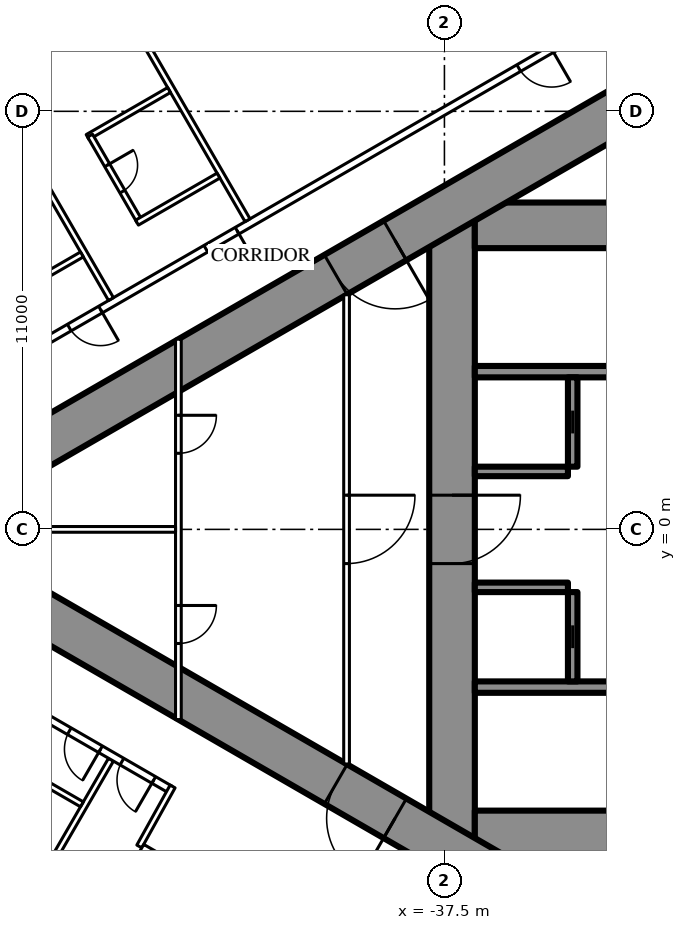
"""IFC4 building model, lengths in metres.
Left out: names, types, materials, properties, quantities, classifications, styles, units other than length and angle.
Written with IfcOpenShell. Run it as: python <this file> out.ifc"""

import sys

from ifc_helpers import new_model, si_unit, direction, frame, frame_2d, origin, place, context, subcontext, project, spatial, rectangle, extrude, element, fill, save


model = new_model("IFC4")
c1 = context("Model", 3, precision=1e-05, world=origin(), true_north=direction((0.0, 1.0)))
c2 = subcontext(c1, "Body", "Model", "MODEL_VIEW")
j1 = project(units=[si_unit("LENGTHUNIT", "METRE"), si_unit("PLANEANGLEUNIT", "RADIAN")], contexts=[c1])
p1 = place(None, origin())
s1 = spatial("IfcSite", under=j1, at=p1, CompositionType="ELEMENT")
p2 = place(p1, origin())
s2 = spatial("IfcBuilding", under=s1, at=p2, CompositionType="ELEMENT")
p3 = place(p2, frame((0.0, 0.0, 215.3)))
s3 = spatial("IfcBuildingStorey", under=s2, at=p3, CompositionType="ELEMENT", Elevation=215.3)
p4 = place(p3, frame((-37.3, 8.6, 0.0), z_axis=(0.0, 0.0, 1.0), x_axis=(0.0, -1.0, 0.0)))
e1 = element("IfcWall", 1, at=p4, inside=s3, PredefinedType="SHEAR", context=c2, shape_type="SweptSolid", body=[
    extrude(rectangle(XDim=17.2, YDim=1.2, at=frame_2d((8.6, 0.0))), origin(), (0.0, 0.0, 1.0), 3.6),
])
p5 = place(p4, frame((7.7, 0.0, 0.0)))
e2 = element("IfcOpeningElement", 2, at=p5, cuts=e1, PredefinedType="OPENING", context=c2, shape_type="SweptSolid", body=[
    extrude(rectangle(XDim=1.8, YDim=2.2, at=frame_2d((0.9, 1.1))), frame((0.0, 0.61, 0.0), z_axis=(0.0, -1.0, 0.0), x_axis=(1.0, 0.0, 0.0)), (0.0, 0.0, 1.0), 1.22),
])
p6 = place(p3, frame((-28.3, 8.0, 0.0), z_axis=(0.0, 0.0, 1.0), x_axis=(-1.0, 0.0, 0.0)))
e3 = element("IfcWall", 3, at=p6, inside=s3, PredefinedType="SHEAR", context=c2, shape_type="SweptSolid", body=[
    extrude(rectangle(XDim=8.4, YDim=1.2, at=frame_2d((4.2, 0.0))), origin(), (0.0, 0.0, 1.0), 3.6),
])
p7 = place(p6, frame((0.25, 0.0, 0.0)))
e4 = element("IfcOpeningElement", 4, at=p7, cuts=e3, PredefinedType="OPENING", context=c2, shape_type="SweptSolid", body=[
    extrude(rectangle(XDim=1.0, YDim=2.2, at=frame_2d((0.5, 1.1))), frame((0.0, 0.61, 0.0), z_axis=(0.0, -1.0, 0.0), x_axis=(1.0, 0.0, 0.0)), (0.0, 0.0, 1.0), 1.22),
])
p8 = place(p3, frame((-28.3, -8.0, 0.0), z_axis=(0.0, 0.0, 1.0), x_axis=(-1.0, 0.0, 0.0)))
e5 = element("IfcWall", 5, at=p8, inside=s3, PredefinedType="SHEAR", context=c2, shape_type="SweptSolid", body=[
    extrude(rectangle(XDim=8.4, YDim=1.2, at=frame_2d((4.2, 0.0))), origin(), (0.0, 0.0, 1.0), 3.6),
])
p9 = place(p8, frame((0.25, 0.0, 0.0)))
e6 = element("IfcOpeningElement", 6, at=p9, cuts=e5, PredefinedType="OPENING", context=c2, shape_type="SweptSolid", body=[
    extrude(rectangle(XDim=1.0, YDim=2.2, at=frame_2d((0.5, 1.1))), frame((0.0, 0.61, 0.0), z_axis=(0.0, -1.0, 0.0), x_axis=(1.0, 0.0, 0.0)), (0.0, 0.0, 1.0), 1.22),
])
for number, where, z_axis, x_axis in (
    (7, (-28.3, 4.15, 0.0), (0.0, 0.0, 1.0), (-1.0, 0.0, 0.0)),
    (8, (-28.3, -4.15, 0.0), (0.0, 0.0, 1.0), (-1.0, 0.0, 0.0)),
):
    element("IfcWall", number, at=place(p3, frame(where, z_axis=z_axis, x_axis=x_axis)), inside=s3, PredefinedType="SHEAR", context=c2, shape_type="SweptSolid", body=[
        extrude(rectangle(XDim=8.4, YDim=0.3, at=frame_2d((4.2, 0.0))), origin(), (0.0, 0.0, 1.0), 3.6),
    ])
p10 = place(p3, frame((-34.125, 4.0, 0.0), z_axis=(0.0, 0.0, 1.0), x_axis=(0.0, -1.0, 0.0)))
e9 = element("IfcWall", 9, at=p10, inside=s3, PredefinedType="SHEAR", context=c2, shape_type="SweptSolid", body=[
    extrude(rectangle(XDim=2.35, YDim=0.25, at=frame_2d((1.175, 0.0))), origin(), (0.0, 0.0, 1.0), 3.6),
])
p11 = place(p10, frame((0.875, 0.0, 0.0)))
e10 = element("IfcOpeningElement", 10, at=p11, cuts=e9, PredefinedType="OPENING", context=c2, shape_type="SweptSolid", body=[
    extrude(rectangle(XDim=0.6, YDim=2.0, at=frame_2d((0.3, 1.0))), frame((0.0, 0.135, 0.0), z_axis=(0.0, -1.0, 0.0), x_axis=(1.0, 0.0, 0.0)), (0.0, 0.0, 1.0), 0.27),
])
p12 = place(p3, frame((-34.25, 1.525, 0.0), z_axis=(0.0, 0.0, 1.0), x_axis=(-1.0, 0.0, 0.0)))
e11 = element("IfcWall", 11, at=p12, inside=s3, PredefinedType="SHEAR", context=c2, shape_type="SweptSolid", body=[
    extrude(rectangle(XDim=2.45, YDim=0.25, at=frame_2d((1.225, 0.0))), origin(), (0.0, 0.0, 1.0), 3.6),
])
p13 = place(p3, frame((-34.125, -1.65, 0.0), z_axis=(0.0, 0.0, 1.0), x_axis=(0.0, -1.0, 0.0)))
e12 = element("IfcWall", 12, at=p13, inside=s3, PredefinedType="SHEAR", context=c2, shape_type="SweptSolid", body=[
    extrude(rectangle(XDim=2.35, YDim=0.25, at=frame_2d((1.175, 0.0))), origin(), (0.0, 0.0, 1.0), 3.6),
])
p14 = place(p13, frame((0.875, 0.0, 0.0)))
e13 = element("IfcOpeningElement", 13, at=p14, cuts=e12, PredefinedType="OPENING", context=c2, shape_type="SweptSolid", body=[
    extrude(rectangle(XDim=0.6, YDim=2.0, at=frame_2d((0.3, 1.0))), frame((0.0, 0.135, 0.0), z_axis=(0.0, -1.0, 0.0), x_axis=(1.0, 0.0, 0.0)), (0.0, 0.0, 1.0), 0.27),
])
p15 = place(p3, frame((-34.25, -1.525, 0.0), z_axis=(0.0, 0.0, 1.0), x_axis=(-1.0, 0.0, 0.0)))
e14 = element("IfcWall", 14, at=p15, inside=s3, PredefinedType="SHEAR", context=c2, shape_type="SweptSolid", body=[
    extrude(rectangle(XDim=2.45, YDim=0.25, at=frame_2d((1.225, 0.0))), origin(), (0.0, 0.0, 1.0), 3.6),
])
p16 = place(p3, frame((-27.2, 14.3, 0.0), z_axis=(0.0, 0.0, 1.0), x_axis=(-0.866026593062, -0.499997940104, 0.0)))
e15 = element("IfcWall", 15, at=p16, inside=s3, PredefinedType="SHEAR", context=c2, shape_type="SweptSolid", body=[
    extrude(rectangle(XDim=28.946, YDim=1.2, at=frame_2d((14.473, 0.0))), origin(), (0.0, 0.0, 1.0), 3.6),
])
p17 = place(p16, frame((4.6, 0.0, 0.0)))
e16 = element("IfcOpeningElement", 16, at=p17, cuts=e15, PredefinedType="OPENING", context=c2, shape_type="SweptSolid", body=[
    extrude(rectangle(XDim=1.0, YDim=2.2, at=frame_2d((0.5, 1.1))), frame((0.0, 0.61, 0.0), z_axis=(0.0, -1.0, 0.0), x_axis=(1.0, 0.0, 0.0)), (0.0, 0.0, 1.0), 1.22),
])
p18 = place(p16, frame((13.395, 0.0, 0.0)))
e17 = element("IfcOpeningElement", 17, at=p18, cuts=e15, PredefinedType="OPENING", context=c2, shape_type="SweptSolid", body=[
    extrude(rectangle(XDim=1.8, YDim=2.2, at=frame_2d((0.9, 1.1))), frame((0.0, 0.61, 0.0), z_axis=(0.0, -1.0, 0.0), x_axis=(1.0, 0.0, 0.0)), (0.0, 0.0, 1.0), 1.22),
])
p19 = place(p3, frame((-27.2, -14.3, 0.0), z_axis=(0.0, 0.0, 1.0), x_axis=(-0.866024021859, 0.500002393557, 0.0)))
e18 = element("IfcWall", 18, at=p19, inside=s3, PredefinedType="SHEAR", context=c2, shape_type="SweptSolid", body=[
    extrude(rectangle(XDim=27.907, YDim=1.2, at=frame_2d((13.954, 0.0))), origin(), (0.0, 0.0, 1.0), 3.6),
])
p20 = place(p19, frame((4.6, 0.0, 0.0)))
e19 = element("IfcOpeningElement", 19, at=p20, cuts=e18, PredefinedType="OPENING", context=c2, shape_type="SweptSolid", body=[
    extrude(rectangle(XDim=1.0, YDim=2.2, at=frame_2d((0.5, 1.1))), frame((0.0, 0.61, 0.0), z_axis=(0.0, -1.0, 0.0), x_axis=(1.0, 0.0, 0.0)), (0.0, 0.0, 1.0), 1.22),
])
p21 = place(p19, frame((13.395, 0.0, 0.0)))
e20 = element("IfcOpeningElement", 20, at=p21, cuts=e18, PredefinedType="OPENING", context=c2, shape_type="SweptSolid", body=[
    extrude(rectangle(XDim=1.8, YDim=2.2, at=frame_2d((0.9, 1.1))), frame((0.0, 0.61, 0.0), z_axis=(0.0, -1.0, 0.0), x_axis=(1.0, 0.0, 0.0)), (0.0, 0.0, 1.0), 1.22),
])
p22 = place(p3, frame((-28.737, 16.068, 0.0), z_axis=(0.0, 0.0, 1.0), x_axis=(-0.866026057212, -0.499998868229, 0.0)))
e21 = element("IfcWall", 21, at=p22, inside=s3, PredefinedType="PARTITIONING", context=c2, shape_type="SweptSolid", body=[
    extrude(rectangle(XDim=32.137, YDim=0.2, at=frame_2d((16.068, 0.0))), origin(), (0.0, 0.0, 1.0), 3.35),
])
p23 = place(p22, frame((1.08, 0.0, 0.0)))
e22 = element("IfcOpeningElement", 22, at=p23, cuts=e21, PredefinedType="OPENING", context=c2, shape_type="SweptSolid", body=[
    extrude(rectangle(XDim=1.8, YDim=2.03, at=frame_2d((0.9, 1.015))), frame((0.0, 0.11, 0.0), z_axis=(0.0, -1.0, 0.0), x_axis=(1.0, 0.0, 0.0)), (0.0, 0.0, 1.0), 0.22),
])
p24 = place(p22, frame((6.86, 0.0, 0.0)))
e23 = element("IfcOpeningElement", 23, at=p24, cuts=e21, PredefinedType="OPENING", context=c2, shape_type="SweptSolid", body=[
    extrude(rectangle(XDim=1.0, YDim=2.2, at=frame_2d((0.5, 1.1))), frame((0.0, 0.11, 0.0), z_axis=(0.0, -1.0, 0.0), x_axis=(1.0, 0.0, 0.0)), (0.0, 0.0, 1.0), 0.22),
])
p25 = place(p22, frame((16.418, 0.0, 0.0)))
e24 = element("IfcOpeningElement", 24, at=p25, cuts=e21, PredefinedType="OPENING", context=c2, shape_type="SweptSolid", body=[
    extrude(rectangle(XDim=0.95, YDim=2.2, at=frame_2d((0.475, 1.1))), frame((0.0, 0.11, 0.0), z_axis=(0.0, -1.0, 0.0), x_axis=(1.0, 0.0, 0.0)), (0.0, 0.0, 1.0), 0.22),
])
p26 = place(p22, frame((20.567, 0.0, 0.0)))
e25 = element("IfcOpeningElement", 25, at=p26, cuts=e21, PredefinedType="OPENING", context=c2, shape_type="SweptSolid", body=[
    extrude(rectangle(XDim=0.95, YDim=2.2, at=frame_2d((0.475, 1.1))), frame((0.0, 0.11, 0.0), z_axis=(0.0, -1.0, 0.0), x_axis=(1.0, 0.0, 0.0)), (0.0, 0.0, 1.0), 0.22),
])
p27 = place(p22, frame((27.065, 0.0, 0.0)))
e26 = element("IfcOpeningElement", 26, at=p27, cuts=e21, PredefinedType="OPENING", context=c2, shape_type="SweptSolid", body=[
    extrude(rectangle(XDim=0.95, YDim=2.2, at=frame_2d((0.475, 1.1))), frame((0.0, 0.11, 0.0), z_axis=(0.0, -1.0, 0.0), x_axis=(1.0, 0.0, 0.0)), (0.0, 0.0, 1.0), 0.22),
])
p28 = place(p3, frame((-42.68, 8.134, 0.0), z_axis=(0.0, 0.0, 1.0), x_axis=(-0.499984479505, 0.866034364361, 0.0)))
e27 = element("IfcWall", 27, at=p28, inside=s3, PredefinedType="PARTITIONING", context=c2, shape_type="SweptSolid", body=[
    extrude(rectangle(XDim=5.995, YDim=0.15, at=frame_2d((2.998, 0.0))), origin(), (0.0, 0.0, 1.0), 2.45),
])
for number, where, z_axis, x_axis in (
    (28, (-46.274, 6.059, 0.0), (0.0, 0.0, 1.0), (-0.5, 0.866, 0.0)),
    (29, (-46.274, -6.059, 0.0), (0.0, 0.0, 1.0), (-0.5, -0.866, 0.0)),
):
    element("IfcWall", number, at=place(p3, frame(where, z_axis=z_axis, x_axis=x_axis)), inside=s3, PredefinedType="PARTITIONING", context=c2, shape_type="SweptSolid", body=[
        extrude(rectangle(XDim=6.028, YDim=0.15, at=frame_2d((3.014, 0.0))), origin(), (0.0, 0.0, 1.0), 2.45),
    ])
p29 = place(p3, frame((-44.715, -6.844, 0.0), z_axis=(0.0, 0.0, 1.0), x_axis=(-0.866025261224, 0.500000246922, 0.0)))
e30 = element("IfcWall", 30, at=p29, inside=s3, PredefinedType="PARTITIONING", context=c2, shape_type="SweptSolid", body=[
    extrude(rectangle(XDim=13.567, YDim=0.2, at=frame_2d((6.783, 0.0))), origin(), (0.0, 0.0, 1.0), 3.35),
])
p30 = place(p29, frame((9.667, 0.0, 0.0)))
e31 = element("IfcOpeningElement", 31, at=p30, cuts=e30, PredefinedType="OPENING", context=c2, shape_type="SweptSolid", body=[
    extrude(rectangle(XDim=0.95, YDim=2.2, at=frame_2d((0.475, 1.1))), frame((0.0, 0.11, 0.0), z_axis=(0.0, -1.0, 0.0), x_axis=(1.0, 0.0, 0.0)), (0.0, 0.0, 1.0), 0.22),
])
p31 = place(p29, frame((2.117, 0.0, 0.0)))
e32 = element("IfcOpeningElement", 32, at=p31, cuts=e30, PredefinedType="OPENING", context=c2, shape_type="SweptSolid", body=[
    extrude(rectangle(XDim=0.95, YDim=2.2, at=frame_2d((0.475, 1.1))), frame((0.0, 0.11, 0.0), z_axis=(0.0, -1.0, 0.0), x_axis=(1.0, 0.0, 0.0)), (0.0, 0.0, 1.0), 0.22),
])
p32 = place(p29, frame((0.5, 0.0, 0.0)))
e33 = element("IfcOpeningElement", 33, at=p32, cuts=e30, PredefinedType="OPENING", context=c2, shape_type="SweptSolid", body=[
    extrude(rectangle(XDim=0.967, YDim=2.2, at=frame_2d((0.483, 1.1))), frame((0.0, 0.11, 0.0), z_axis=(0.0, -1.0, 0.0), x_axis=(1.0, 0.0, 0.0)), (0.0, 0.0, 1.0), 0.22),
])
p33 = place(p3, frame((-44.652, -6.764, 0.0), z_axis=(0.0, 0.0, 1.0), x_axis=(-0.485424724123, -0.874278466629, 0.0)))
e34 = element("IfcWall", 34, at=p33, inside=s3, PredefinedType="PARTITIONING", context=c2, shape_type="SweptSolid", body=[
    extrude(rectangle(XDim=1.805, YDim=0.15, at=frame_2d((0.903, 0.0))), origin(), (0.0, 0.0, 1.0), 3.35),
])
p34 = place(p3, frame((-44.745, 11.56, 0.0), z_axis=(0.0, 0.0, 1.0), x_axis=(-0.866006523861, -0.500032699561, 0.0)))
e35 = element("IfcWall", 35, at=p34, inside=s3, PredefinedType="PARTITIONING", context=c2, shape_type="SweptSolid", body=[
    extrude(rectangle(XDim=2.475, YDim=0.15, at=frame_2d((1.237, 0.0))), origin(), (0.0, 0.0, 1.0), 3.35),
])
p35 = place(p3, frame((-45.524, 8.109, 0.0), z_axis=(0.0, 0.0, 1.0), x_axis=(-0.49997716683, 0.86603858612, 0.0)))
e36 = element("IfcWall", 36, at=p35, inside=s3, PredefinedType="PARTITIONING", context=c2, shape_type="SweptSolid", body=[
    extrude(rectangle(XDim=2.6, YDim=0.15, at=frame_2d((1.3, 0.0))), origin(), (0.0, 0.0, 1.0), 3.35),
])
p36 = place(p35, frame((0.9, 0.0, 0.0)))
e37 = element("IfcOpeningElement", 37, at=p36, cuts=e36, PredefinedType="OPENING", context=c2, shape_type="SweptSolid", body=[
    extrude(rectangle(XDim=0.8, YDim=2.2, at=frame_2d((0.4, 1.1))), frame((0.0, 0.085, 0.0), z_axis=(0.0, -1.0, 0.0), x_axis=(1.0, 0.0, 0.0)), (0.0, 0.0, 1.0), 0.17),
])
for number, where, z_axis, x_axis in (
    (38, (-43.445, 9.309, 0.0), (0.0, 0.0, 1.0), (-0.866, -0.5, 0.0)),
    (39, (-47.039, 7.234, 0.0), (0.0, 0.0, 1.0), (-0.866, -0.5, 0.0)),
):
    element("IfcWall", number, at=place(p3, frame(where, z_axis=z_axis, x_axis=x_axis)), inside=s3, PredefinedType="PARTITIONING", context=c2, shape_type="SweptSolid", body=[
        extrude(rectangle(XDim=2.475, YDim=0.15, at=frame_2d((1.238, 0.0))), origin(), (0.0, 0.0, 1.0), 3.35),
    ])
p37 = place(p3, frame((-47.039, -7.234, 0.0), z_axis=(0.0, 0.0, 1.0), x_axis=(-0.866073894602, 0.499916002032, 0.0)))
e40 = element("IfcWall", 40, at=p37, inside=s3, PredefinedType="PARTITIONING", context=c2, shape_type="SweptSolid", body=[
    extrude(rectangle(XDim=2.475, YDim=0.15, at=frame_2d((1.238, 0.0))), origin(), (0.0, 0.0, 1.0), 2.5),
])
p38 = place(p3, frame((-40.075, 6.174, 0.0), z_axis=(0.0, 0.0, 1.0), x_axis=(0.0, -1.0, 0.0)))
e41 = element("IfcWall", 41, at=p38, inside=s3, PredefinedType="PARTITIONING", context=c2, shape_type="SweptSolid", body=[
    extrude(rectangle(XDim=12.348, YDim=0.15, at=frame_2d((6.174, 0.0))), origin(), (0.0, 0.0, 1.0), 3.35),
])
p39 = place(p38, frame((5.274, 0.0, 0.0)))
e42 = element("IfcOpeningElement", 42, at=p39, cuts=e41, PredefinedType="OPENING", context=c2, shape_type="SweptSolid", body=[
    extrude(rectangle(XDim=1.8, YDim=2.2, at=frame_2d((0.9, 1.1))), frame((0.0, 0.085, 0.0), z_axis=(0.0, -1.0, 0.0), x_axis=(1.0, 0.0, 0.0)), (0.0, 0.0, 1.0), 0.17),
])
p40 = place(p3, frame((-44.5, 5.005, 0.0), z_axis=(0.0, 0.0, 1.0), x_axis=(0.0, -1.0, 0.0)))
e43 = element("IfcWall", 43, at=p40, inside=s3, PredefinedType="PARTITIONING", context=c2, shape_type="SweptSolid", body=[
    extrude(rectangle(XDim=10.009, YDim=0.15, at=frame_2d((5.005, 0.0))), origin(), (0.0, 0.0, 1.0), 2.5),
])
p41 = place(p40, frame((2.002, 0.0, 0.0)))
e44 = element("IfcOpeningElement", 44, at=p41, cuts=e43, PredefinedType="OPENING", context=c2, shape_type="SweptSolid", body=[
    extrude(rectangle(XDim=1.0, YDim=2.2, at=frame_2d((0.5, 1.1))), frame((0.0, 0.085, 0.0), z_axis=(0.0, -1.0, 0.0), x_axis=(1.0, 0.0, 0.0)), (0.0, 0.0, 1.0), 0.17),
])
p42 = place(p40, frame((7.007, 0.0, 0.0)))
e45 = element("IfcOpeningElement", 45, at=p42, cuts=e43, PredefinedType="OPENING", context=c2, shape_type="SweptSolid", body=[
    extrude(rectangle(XDim=1.0, YDim=2.2, at=frame_2d((0.5, 1.1))), frame((0.0, 0.085, 0.0), z_axis=(0.0, -1.0, 0.0), x_axis=(1.0, 0.0, 0.0)), (0.0, 0.0, 1.0), 0.17),
])
p43 = place(p3, frame((-44.575, 0.0, 0.0), z_axis=(0.0, 0.0, 1.0), x_axis=(-1.0, 0.0, 0.0)))
e46 = element("IfcWall", 46, at=p43, inside=s3, PredefinedType="PARTITIONING", context=c2, shape_type="SweptSolid", body=[
    extrude(rectangle(XDim=8.593, YDim=0.15, at=frame_2d((4.297, 0.0))), origin(), (0.0, 0.0, 1.0), 2.45),
])
p44 = place(p3, frame((-39.758, -11.697, 0.0), z_axis=(0.0, 0.0, 1.0), x_axis=(-0.866024194504, 0.500002094529, 0.0)))
e47 = element("IfcWall", 47, at=p44, inside=s3, PredefinedType="PARTITIONING", context=c2, shape_type="SweptSolid", body=[
    extrude(rectangle(XDim=6.6, YDim=0.25, at=frame_2d((3.3, 0.0))), origin(), (0.0, 0.0, 1.0), 3.35),
])
p45 = place(p44, frame((0.75, 0.0, 0.0)))
e48 = element("IfcOpeningElement", 48, at=p45, cuts=e47, PredefinedType="OPENING", context=c2, shape_type="SweptSolid", body=[
    extrude(rectangle(XDim=1.1, YDim=2.2, at=frame_2d((0.55, 1.1))), frame((0.0, 0.135, 0.0), z_axis=(0.0, -1.0, 0.0), x_axis=(1.0, 0.0, 0.0)), (0.0, 0.0, 1.0), 0.27),
])
p46 = place(p44, frame((2.75, 0.0, 0.0)))
e49 = element("IfcOpeningElement", 49, at=p46, cuts=e47, PredefinedType="OPENING", context=c2, shape_type="SweptSolid", body=[
    extrude(rectangle(XDim=1.1, YDim=2.2, at=frame_2d((0.55, 1.1))), frame((0.0, 0.135, 0.0), z_axis=(0.0, -1.0, 0.0), x_axis=(1.0, 0.0, 0.0)), (0.0, 0.0, 1.0), 0.27),
])
p47 = place(p44, frame((4.75, 0.0, 0.0)))
e50 = element("IfcOpeningElement", 50, at=p47, cuts=e47, PredefinedType="OPENING", context=c2, shape_type="SweptSolid", body=[
    extrude(rectangle(XDim=1.1, YDim=2.2, at=frame_2d((0.55, 1.1))), frame((0.0, 0.135, 0.0), z_axis=(0.0, -1.0, 0.0), x_axis=(1.0, 0.0, 0.0)), (0.0, 0.0, 1.0), 0.27),
])
p48 = place(p24, origin())
e51 = element("IfcDoor", 51, at=p48, inside=s3, OperationType="SINGLE_SWING_LEFT", PredefinedType="DOOR", context=c2, shape_type="SweptSolid", body=[
    extrude(rectangle(XDim=1.0, YDim=2.2, at=frame_2d((0.5, 1.1))), frame((0.0, 0.025, 0.0), z_axis=(0.0, -1.0, 0.0), x_axis=(1.0, 0.0, 0.0)), (0.0, 0.0, 1.0), 0.05),
])
fill(e23, e51)
p49 = place(p36, origin())
e52 = element("IfcDoor", 52, at=p49, inside=s3, OperationType="SINGLE_SWING_RIGHT", PredefinedType="DOOR", context=c2, shape_type="SweptSolid", body=[
    extrude(rectangle(XDim=0.8, YDim=2.2, at=frame_2d((0.4, 1.1))), frame((0.0, 0.025, 0.0), z_axis=(0.0, -1.0, 0.0), x_axis=(1.0, 0.0, 0.0)), (0.0, 0.0, 1.0), 0.05),
])
fill(e37, e52)
p50 = place(p25, origin())
e53 = element("IfcDoor", 53, at=p50, inside=s3, OperationType="SINGLE_SWING_LEFT", PredefinedType="DOOR", context=c2, shape_type="SweptSolid", body=[
    extrude(rectangle(XDim=0.95, YDim=2.2, at=frame_2d((0.475, 1.1))), frame((0.0, 0.025, 0.0), z_axis=(0.0, -1.0, 0.0), x_axis=(1.0, 0.0, 0.0)), (0.0, 0.0, 1.0), 0.05),
])
fill(e24, e53)
p51 = place(p26, origin())
e54 = element("IfcDoor", 54, at=p51, inside=s3, OperationType="SINGLE_SWING_LEFT", PredefinedType="DOOR", context=c2, shape_type="SweptSolid", body=[
    extrude(rectangle(XDim=0.95, YDim=2.2, at=frame_2d((0.475, 1.1))), frame((0.0, 0.025, 0.0), z_axis=(0.0, -1.0, 0.0), x_axis=(1.0, 0.0, 0.0)), (0.0, 0.0, 1.0), 0.05),
])
fill(e25, e54)
p52 = place(p31, origin())
e55 = element("IfcDoor", 55, at=p52, inside=s3, OperationType="SINGLE_SWING_LEFT", PredefinedType="DOOR", context=c2, shape_type="SweptSolid", body=[
    extrude(rectangle(XDim=0.95, YDim=2.2, at=frame_2d((0.475, 1.1))), frame((0.0, 0.025, 0.0), z_axis=(0.0, -1.0, 0.0), x_axis=(1.0, 0.0, 0.0)), (0.0, 0.0, 1.0), 0.05),
])
fill(e32, e55)
p53 = place(p32, origin())
e56 = element("IfcDoor", 56, at=p53, inside=s3, OperationType="SINGLE_SWING_LEFT", PredefinedType="DOOR", context=c2, shape_type="SweptSolid", body=[
    extrude(rectangle(XDim=0.967, YDim=2.2, at=frame_2d((0.483, 1.1))), frame((0.0, 0.025, 0.0), z_axis=(0.0, -1.0, 0.0), x_axis=(1.0, 0.0, 0.0)), (0.0, 0.0, 1.0), 0.05),
])
fill(e33, e56)
p54 = place(p39, origin())
e57 = element("IfcDoor", 57, at=p54, inside=s3, OperationType="DOUBLE_DOOR_SINGLE_SWING", PredefinedType="DOOR", context=c2, shape_type="SweptSolid", body=[
    extrude(rectangle(XDim=1.8, YDim=2.2, at=frame_2d((0.9, 1.1))), frame((0.0, 0.025, 0.0), z_axis=(0.0, -1.0, 0.0), x_axis=(1.0, 0.0, 0.0)), (0.0, 0.0, 1.0), 0.05),
])
fill(e42, e57)
p55 = place(p41, origin())
e58 = element("IfcDoor", 58, at=p55, inside=s3, OperationType="SINGLE_SWING_LEFT", PredefinedType="DOOR", context=c2, shape_type="SweptSolid", body=[
    extrude(rectangle(XDim=1.0, YDim=2.2, at=frame_2d((0.5, 1.1))), frame((0.0, 0.025, 0.0), z_axis=(0.0, -1.0, 0.0), x_axis=(1.0, 0.0, 0.0)), (0.0, 0.0, 1.0), 0.05),
])
fill(e44, e58)
p56 = place(p42, origin())
e59 = element("IfcDoor", 59, at=p56, inside=s3, OperationType="SINGLE_SWING_LEFT", PredefinedType="DOOR", context=c2, shape_type="SweptSolid", body=[
    extrude(rectangle(XDim=1.0, YDim=2.2, at=frame_2d((0.5, 1.1))), frame((0.0, 0.025, 0.0), z_axis=(0.0, -1.0, 0.0), x_axis=(1.0, 0.0, 0.0)), (0.0, 0.0, 1.0), 0.05),
])
fill(e45, e59)
p57 = place(p18, origin())
e60 = element("IfcDoor", 60, at=p57, inside=s3, OperationType="DOUBLE_DOOR_SINGLE_SWING", PredefinedType="DOOR", context=c2, shape_type="SweptSolid", body=[
    extrude(rectangle(XDim=1.8, YDim=2.2, at=frame_2d((0.9, 1.1))), frame((0.0, 0.025, 0.0), z_axis=(0.0, -1.0, 0.0), x_axis=(1.0, 0.0, 0.0)), (0.0, 0.0, 1.0), 0.05),
])
fill(e17, e60)
p58 = place(p21, origin())
e61 = element("IfcDoor", 61, at=p58, inside=s3, OperationType="DOUBLE_DOOR_SINGLE_SWING", PredefinedType="DOOR", context=c2, shape_type="SweptSolid", body=[
    extrude(rectangle(XDim=1.8, YDim=2.2, at=frame_2d((0.9, 1.1))), frame((0.0, 0.025, 0.0), z_axis=(0.0, -1.0, 0.0), x_axis=(1.0, 0.0, 0.0)), (0.0, 0.0, 1.0), 0.05),
])
fill(e20, e61)
p59 = place(p5, origin())
e62 = element("IfcDoor", 62, at=p59, inside=s3, OperationType="DOUBLE_DOOR_SINGLE_SWING", PredefinedType="DOOR", context=c2, shape_type="SweptSolid", body=[
    extrude(rectangle(XDim=1.8, YDim=2.2, at=frame_2d((0.9, 1.1))), frame((0.0, 0.025, 0.0), z_axis=(0.0, -1.0, 0.0), x_axis=(1.0, 0.0, 0.0)), (0.0, 0.0, 1.0), 0.05),
])
fill(e2, e62)
p60 = place(p11, origin())
e63 = element("IfcDoor", 63, at=p60, inside=s3, OperationType="SLIDING_TO_LEFT", PredefinedType="DOOR", context=c2, shape_type="SweptSolid", body=[
    extrude(rectangle(XDim=0.6, YDim=2.0, at=frame_2d((0.3, 1.0))), frame((0.0, 0.025, 0.0), z_axis=(0.0, -1.0, 0.0), x_axis=(1.0, 0.0, 0.0)), (0.0, 0.0, 1.0), 0.05),
])
fill(e10, e63)
p61 = place(p14, origin())
e64 = element("IfcDoor", 64, at=p61, inside=s3, OperationType="SLIDING_TO_LEFT", PredefinedType="DOOR", context=c2, shape_type="SweptSolid", body=[
    extrude(rectangle(XDim=0.6, YDim=2.0, at=frame_2d((0.3, 1.0))), frame((0.0, 0.025, 0.0), z_axis=(0.0, -1.0, 0.0), x_axis=(1.0, 0.0, 0.0)), (0.0, 0.0, 1.0), 0.05),
])
fill(e13, e64)
save(model, sys.argv[1])
